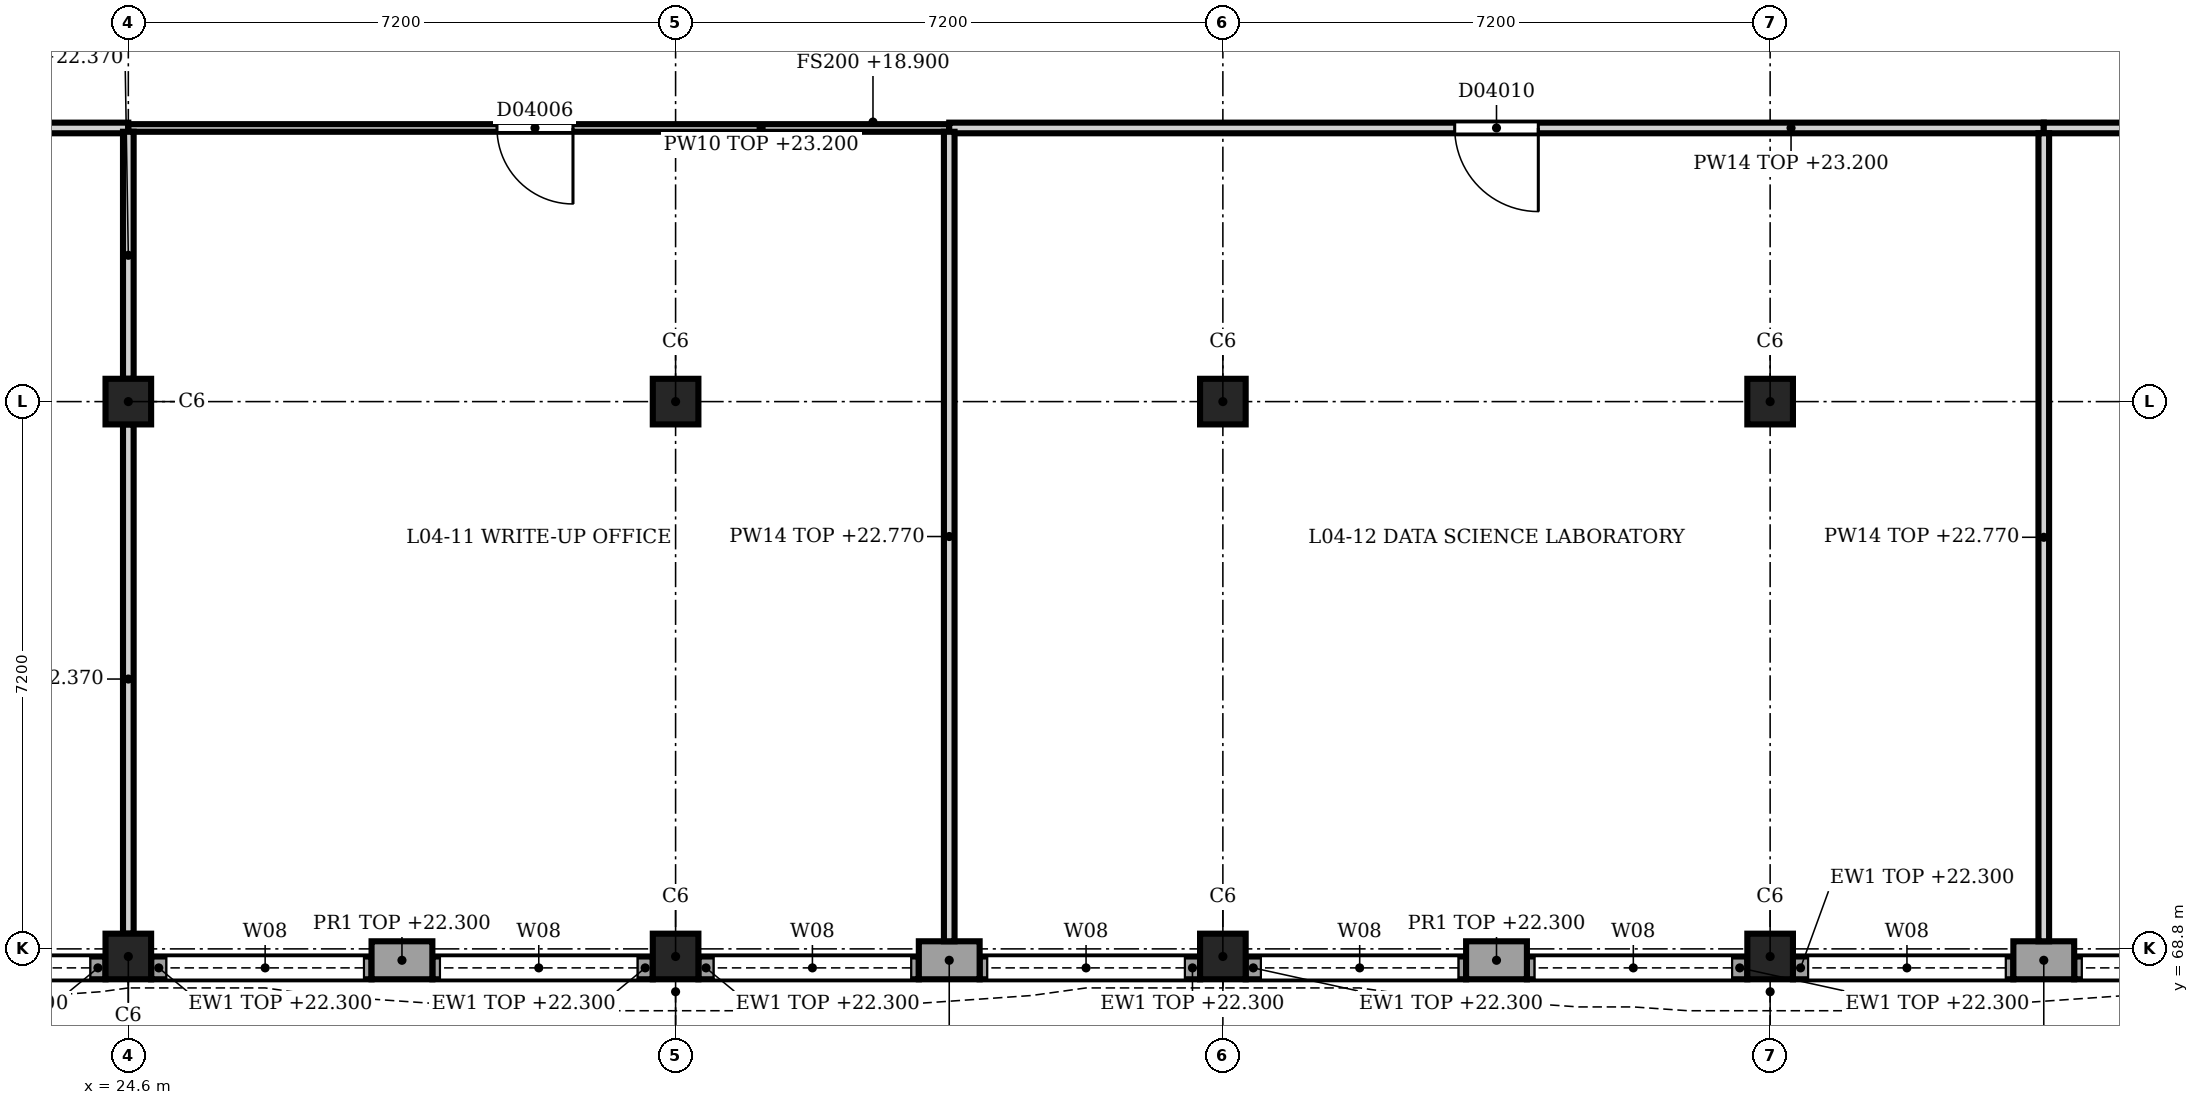
"""IFC4 building model, lengths in metres.
Left out: names, types, materials, properties, quantities, classifications, styles, units other than length and angle.
Written with IfcOpenShell. Run it as: python <this file> out.ifc"""

import sys

from ifc_helpers import new_model, si_unit, direction, frame, frame_2d, origin, origin_2d, place, context, subcontext, project, spatial, rectangle, extrude, element, fill, save


model = new_model("IFC4")
c1 = context("Model", 3, precision=1e-05, world=origin(), true_north=direction((0.0, 1.0)))
c2 = subcontext(c1, "Body", "Model", "MODEL_VIEW")
j1 = project(units=[si_unit("LENGTHUNIT", "METRE"), si_unit("PLANEANGLEUNIT", "RADIAN")], contexts=[c1])
p1 = place(None, origin())
s1 = spatial("IfcSite", under=j1, at=p1, CompositionType="ELEMENT")
p2 = place(p1, origin())
s2 = spatial("IfcBuilding", under=s1, at=p2, CompositionType="ELEMENT")
p3 = place(p2, frame((0.0, 0.0, 18.9)))
s3 = spatial("IfcBuildingStorey", under=s2, at=p3, CompositionType="ELEMENT", Elevation=18.9)
for number, where, z_axis, x_axis in (
    (1, (24.6, 68.7, 0.0), (0.0, 0.0, 1.0), (1.0, 0.0, 0.0)),
    (2, (24.6, 76.0, 0.0), (0.0, 0.0, 1.0), (1.0, 0.0, 0.0)),
    (3, (31.8, 68.7, 0.0), (0.0, 0.0, 1.0), (1.0, 0.0, 0.0)),
    (4, (31.8, 76.0, 0.0), (0.0, 0.0, 1.0), (1.0, 0.0, 0.0)),
    (5, (39.0, 68.7, 0.0), (0.0, 0.0, 1.0), (1.0, 0.0, 0.0)),
    (6, (39.0, 76.0, 0.0), (0.0, 0.0, 1.0), (1.0, 0.0, 0.0)),
    (7, (46.2, 68.7, 0.0), (0.0, 0.0, 1.0), (1.0, 0.0, 0.0)),
    (8, (46.2, 76.0, 0.0), (0.0, 0.0, 1.0), (1.0, 0.0, 0.0)),
):
    element("IfcColumn", number, at=place(p3, frame(where, z_axis=z_axis, x_axis=x_axis)), inside=s3, PredefinedType="COLUMN", context=c2, shape_type="SweptSolid", body=[
        extrude(rectangle(XDim=0.6, YDim=0.6, at=origin_2d()), origin(), (0.0, 0.0, 1.0), 4.5),
    ])
for number, where, z_axis, x_axis in (
    (9, (50.2, 68.65, 0.0), (0.0, 0.0, 1.0), (-1.0, 0.0, 0.0)),
    (10, (43.0, 68.65, 0.0), (0.0, 0.0, 1.0), (-1.0, 0.0, 0.0)),
    (11, (35.8, 68.65, 0.0), (0.0, 0.0, 1.0), (-1.0, 0.0, 0.0)),
    (12, (28.6, 68.65, 0.0), (0.0, 0.0, 1.0), (-1.0, 0.0, 0.0)),
):
    element("IfcWall", number, at=place(p3, frame(where, z_axis=z_axis, x_axis=x_axis)), inside=s3, PredefinedType="SOLIDWALL", context=c2, shape_type="SweptSolid", body=[
        extrude(rectangle(XDim=0.8, YDim=0.5, at=frame_2d((0.4, 0.0))), origin(), (0.0, 0.0, 1.0), 3.4),
    ])
p4 = place(p3, frame((53.1, 68.55, 0.0), z_axis=(0.0, 0.0, 1.0), x_axis=(-1.0, 0.0, 0.0)))
e13 = element("IfcWall", 13, at=p4, inside=s3, PredefinedType="SOLIDWALL", context=c2, shape_type="SweptSolid", body=[
    extrude(rectangle(XDim=2.9, YDim=0.3, at=frame_2d((1.45, 0.0))), origin(), (0.0, 0.0, 1.0), 3.4),
])
p5 = place(p4, frame((0.2, 0.0, 1.2)))
e14 = element("IfcOpeningElement", 14, at=p5, cuts=e13, PredefinedType="OPENING", context=c2, shape_type="SweptSolid", body=[
    extrude(rectangle(XDim=2.6, YDim=2.1, at=frame_2d((1.3, 1.05))), frame((0.0, 0.16, 0.0), z_axis=(0.0, -1.0, 0.0), x_axis=(1.0, 0.0, 0.0)), (0.0, 0.0, 1.0), 0.32),
])
p6 = place(p3, frame((49.4, 68.55, 0.0), z_axis=(0.0, 0.0, 1.0), x_axis=(-1.0, 0.0, 0.0)))
e15 = element("IfcWall", 15, at=p6, inside=s3, PredefinedType="SOLIDWALL", context=c2, shape_type="SweptSolid", body=[
    extrude(rectangle(XDim=2.9, YDim=0.3, at=frame_2d((1.45, 0.0))), origin(), (0.0, 0.0, 1.0), 3.4),
])
p7 = place(p6, frame((0.1, 0.0, 1.2)))
e16 = element("IfcOpeningElement", 16, at=p7, cuts=e15, PredefinedType="OPENING", context=c2, shape_type="SweptSolid", body=[
    extrude(rectangle(XDim=2.6, YDim=2.1, at=frame_2d((1.3, 1.05))), frame((0.0, 0.16, 0.0), z_axis=(0.0, -1.0, 0.0), x_axis=(1.0, 0.0, 0.0)), (0.0, 0.0, 1.0), 0.32),
])
p8 = place(p3, frame((45.9, 68.55, 0.0), z_axis=(0.0, 0.0, 1.0), x_axis=(-1.0, 0.0, 0.0)))
e17 = element("IfcWall", 17, at=p8, inside=s3, PredefinedType="SOLIDWALL", context=c2, shape_type="SweptSolid", body=[
    extrude(rectangle(XDim=2.9, YDim=0.3, at=frame_2d((1.45, 0.0))), origin(), (0.0, 0.0, 1.0), 3.4),
])
p9 = place(p8, frame((0.2, 0.0, 1.2)))
e18 = element("IfcOpeningElement", 18, at=p9, cuts=e17, PredefinedType="OPENING", context=c2, shape_type="SweptSolid", body=[
    extrude(rectangle(XDim=2.6, YDim=2.1, at=frame_2d((1.3, 1.05))), frame((0.0, 0.16, 0.0), z_axis=(0.0, -1.0, 0.0), x_axis=(1.0, 0.0, 0.0)), (0.0, 0.0, 1.0), 0.32),
])
p10 = place(p3, frame((42.2, 68.55, 0.0), z_axis=(0.0, 0.0, 1.0), x_axis=(-1.0, 0.0, 0.0)))
e19 = element("IfcWall", 19, at=p10, inside=s3, PredefinedType="SOLIDWALL", context=c2, shape_type="SweptSolid", body=[
    extrude(rectangle(XDim=2.9, YDim=0.3, at=frame_2d((1.45, 0.0))), origin(), (0.0, 0.0, 1.0), 3.4),
])
p11 = place(p10, frame((0.1, 0.0, 1.2)))
e20 = element("IfcOpeningElement", 20, at=p11, cuts=e19, PredefinedType="OPENING", context=c2, shape_type="SweptSolid", body=[
    extrude(rectangle(XDim=2.6, YDim=2.1, at=frame_2d((1.3, 1.05))), frame((0.0, 0.16, 0.0), z_axis=(0.0, -1.0, 0.0), x_axis=(1.0, 0.0, 0.0)), (0.0, 0.0, 1.0), 0.32),
])
p12 = place(p3, frame((38.7, 68.55, 0.0), z_axis=(0.0, 0.0, 1.0), x_axis=(-1.0, 0.0, 0.0)))
e21 = element("IfcWall", 21, at=p12, inside=s3, PredefinedType="SOLIDWALL", context=c2, shape_type="SweptSolid", body=[
    extrude(rectangle(XDim=2.9, YDim=0.3, at=frame_2d((1.45, 0.0))), origin(), (0.0, 0.0, 1.0), 3.4),
])
p13 = place(p12, frame((0.2, 0.0, 1.2)))
e22 = element("IfcOpeningElement", 22, at=p13, cuts=e21, PredefinedType="OPENING", context=c2, shape_type="SweptSolid", body=[
    extrude(rectangle(XDim=2.6, YDim=2.1, at=frame_2d((1.3, 1.05))), frame((0.0, 0.16, 0.0), z_axis=(0.0, -1.0, 0.0), x_axis=(1.0, 0.0, 0.0)), (0.0, 0.0, 1.0), 0.32),
])
p14 = place(p3, frame((35.0, 68.55, 0.0), z_axis=(0.0, 0.0, 1.0), x_axis=(-1.0, 0.0, 0.0)))
e23 = element("IfcWall", 23, at=p14, inside=s3, PredefinedType="SOLIDWALL", context=c2, shape_type="SweptSolid", body=[
    extrude(rectangle(XDim=2.9, YDim=0.3, at=frame_2d((1.45, 0.0))), origin(), (0.0, 0.0, 1.0), 3.4),
])
p15 = place(p14, frame((0.1, 0.0, 1.2)))
e24 = element("IfcOpeningElement", 24, at=p15, cuts=e23, PredefinedType="OPENING", context=c2, shape_type="SweptSolid", body=[
    extrude(rectangle(XDim=2.6, YDim=2.1, at=frame_2d((1.3, 1.05))), frame((0.0, 0.16, 0.0), z_axis=(0.0, -1.0, 0.0), x_axis=(1.0, 0.0, 0.0)), (0.0, 0.0, 1.0), 0.32),
])
p16 = place(p3, frame((31.5, 68.55, 0.0), z_axis=(0.0, 0.0, 1.0), x_axis=(-1.0, 0.0, 0.0)))
e25 = element("IfcWall", 25, at=p16, inside=s3, PredefinedType="SOLIDWALL", context=c2, shape_type="SweptSolid", body=[
    extrude(rectangle(XDim=2.9, YDim=0.3, at=frame_2d((1.45, 0.0))), origin(), (0.0, 0.0, 1.0), 3.4),
])
p17 = place(p16, frame((0.2, 0.0, 1.2)))
e26 = element("IfcOpeningElement", 26, at=p17, cuts=e25, PredefinedType="OPENING", context=c2, shape_type="SweptSolid", body=[
    extrude(rectangle(XDim=2.6, YDim=2.1, at=frame_2d((1.3, 1.05))), frame((0.0, 0.16, 0.0), z_axis=(0.0, -1.0, 0.0), x_axis=(1.0, 0.0, 0.0)), (0.0, 0.0, 1.0), 0.32),
])
p18 = place(p3, frame((27.8, 68.55, 0.0), z_axis=(0.0, 0.0, 1.0), x_axis=(-1.0, 0.0, 0.0)))
e27 = element("IfcWall", 27, at=p18, inside=s3, PredefinedType="SOLIDWALL", context=c2, shape_type="SweptSolid", body=[
    extrude(rectangle(XDim=2.9, YDim=0.3, at=frame_2d((1.45, 0.0))), origin(), (0.0, 0.0, 1.0), 3.4),
])
p19 = place(p18, frame((0.1, 0.0, 1.2)))
e28 = element("IfcOpeningElement", 28, at=p19, cuts=e27, PredefinedType="OPENING", context=c2, shape_type="SweptSolid", body=[
    extrude(rectangle(XDim=2.6, YDim=2.1, at=frame_2d((1.3, 1.05))), frame((0.0, 0.16, 0.0), z_axis=(0.0, -1.0, 0.0), x_axis=(1.0, 0.0, 0.0)), (0.0, 0.0, 1.0), 0.32),
])
p20 = place(p3, frame((24.3, 68.55, 0.0), z_axis=(0.0, 0.0, 1.0), x_axis=(-1.0, 0.0, 0.0)))
e29 = element("IfcWall", 29, at=p20, inside=s3, PredefinedType="SOLIDWALL", context=c2, shape_type="SweptSolid", body=[
    extrude(rectangle(XDim=2.9, YDim=0.3, at=frame_2d((1.45, 0.0))), origin(), (0.0, 0.0, 1.0), 3.4),
])
p21 = place(p20, frame((0.2, 0.0, 1.2)))
e30 = element("IfcOpeningElement", 30, at=p21, cuts=e29, PredefinedType="OPENING", context=c2, shape_type="SweptSolid", body=[
    extrude(rectangle(XDim=2.6, YDim=2.1, at=frame_2d((1.3, 1.05))), frame((0.0, 0.16, 0.0), z_axis=(0.0, -1.0, 0.0), x_axis=(1.0, 0.0, 0.0)), (0.0, 0.0, 1.0), 0.32),
])
p22 = place(p3, frame((24.6, 79.6, 0.0), z_axis=(0.0, 0.0, 1.0), x_axis=(-1.0, 0.0, 0.0)))
e31 = element("IfcWall", 31, at=p22, inside=s3, PredefinedType="PARTITIONING", context=c2, shape_type="SweptSolid", body=[
    extrude(rectangle(XDim=21.5, YDim=0.14, at=frame_2d((10.75, 0.0))), origin(), (0.0, 0.0, 1.0), 4.3),
])
p23 = place(p22, frame((10.25, 0.0, 0.0)))
e32 = element("IfcOpeningElement", 32, at=p23, cuts=e31, PredefinedType="OPENING", context=c2, shape_type="SweptSolid", body=[
    extrude(rectangle(XDim=1.1, YDim=2.2, at=frame_2d((0.55, 1.1))), frame((0.0, 0.08, 0.0), z_axis=(0.0, -1.0, 0.0), x_axis=(1.0, 0.0, 0.0)), (0.0, 0.0, 1.0), 0.16),
])
p24 = place(p3, frame((35.4, 79.6, 0.0), z_axis=(0.0, 0.0, 1.0), x_axis=(-1.0, 0.0, 0.0)))
e33 = element("IfcWall", 33, at=p24, inside=s3, PredefinedType="PARTITIONING", context=c2, shape_type="SweptSolid", body=[
    extrude(rectangle(XDim=10.8, YDim=0.1, at=frame_2d((5.4, 0.0))), origin(), (0.0, 0.0, 1.0), 4.3),
])
p25 = place(p24, frame((4.95, 0.0, 0.0)))
e34 = element("IfcOpeningElement", 34, at=p25, cuts=e33, PredefinedType="OPENING", context=c2, shape_type="SweptSolid", body=[
    extrude(rectangle(XDim=1.0, YDim=2.1, at=frame_2d((0.5, 1.05))), frame((0.0, 0.06, 0.0), z_axis=(0.0, -1.0, 0.0), x_axis=(1.0, 0.0, 0.0)), (0.0, 0.0, 1.0), 0.12),
])
p26 = place(p3, frame((49.8, 79.6, 0.0), z_axis=(0.0, 0.0, 1.0), x_axis=(-1.0, 0.0, 0.0)))
e35 = element("IfcWall", 35, at=p26, inside=s3, PredefinedType="PARTITIONING", context=c2, shape_type="SweptSolid", body=[
    extrude(rectangle(XDim=14.4, YDim=0.14, at=frame_2d((7.2, 0.0))), origin(), (0.0, 0.0, 1.0), 4.3),
])
p27 = place(p26, frame((6.65, 0.0, 0.0)))
e36 = element("IfcOpeningElement", 36, at=p27, cuts=e35, PredefinedType="OPENING", context=c2, shape_type="SweptSolid", body=[
    extrude(rectangle(XDim=1.1, YDim=2.2, at=frame_2d((0.55, 1.1))), frame((0.0, 0.08, 0.0), z_axis=(0.0, -1.0, 0.0), x_axis=(1.0, 0.0, 0.0)), (0.0, 0.0, 1.0), 0.16),
])
p28 = place(p3, frame((64.2, 79.6, 0.0), z_axis=(0.0, 0.0, 1.0), x_axis=(-1.0, 0.0, 0.0)))
e37 = element("IfcWall", 37, at=p28, inside=s3, PredefinedType="PARTITIONING", context=c2, shape_type="SweptSolid", body=[
    extrude(rectangle(XDim=14.4, YDim=0.14, at=frame_2d((7.2, 0.0))), origin(), (0.0, 0.0, 1.0), 4.3),
])
p29 = place(p28, frame((6.65, 0.0, 0.0)))
e38 = element("IfcOpeningElement", 38, at=p29, cuts=e37, PredefinedType="OPENING", context=c2, shape_type="SweptSolid", body=[
    extrude(rectangle(XDim=1.2, YDim=2.1, at=frame_2d((0.6, 1.05))), frame((0.0, 0.08, 0.0), z_axis=(0.0, -1.0, 0.0), x_axis=(1.0, 0.0, 0.0)), (0.0, 0.0, 1.0), 0.16),
])
p30 = place(p3, frame((24.6, 69.0, 0.0), z_axis=(0.0, 0.0, 1.0), x_axis=(0.0, 1.0, 0.0)))
e39 = element("IfcWall", 39, at=p30, inside=s3, PredefinedType="PARTITIONING", context=c2, shape_type="SweptSolid", body=[
    extrude(rectangle(XDim=6.7, YDim=0.14, at=frame_2d((3.35, 0.0))), origin(), (0.0, 0.0, 1.0), 3.47),
])
p31 = place(p3, frame((24.6, 76.3, 0.0), z_axis=(0.0, 0.0, 1.0), x_axis=(0.0, 1.0, 0.0)))
e40 = element("IfcWall", 40, at=p31, inside=s3, PredefinedType="PARTITIONING", context=c2, shape_type="SweptSolid", body=[
    extrude(rectangle(XDim=3.25, YDim=0.14, at=frame_2d((1.625, 0.0))), origin(), (0.0, 0.0, 1.0), 3.47),
])
p32 = place(p3, frame((35.4, 68.9, 0.0), z_axis=(0.0, 0.0, 1.0), x_axis=(0.0, 1.0, 0.0)))
e41 = element("IfcWall", 41, at=p32, inside=s3, PredefinedType="PARTITIONING", context=c2, shape_type="SweptSolid", body=[
    extrude(rectangle(XDim=10.65, YDim=0.14, at=frame_2d((5.325, 0.0))), origin(), (0.0, 0.0, 1.0), 3.87),
])
p33 = place(p3, frame((49.8, 68.9, 0.0), z_axis=(0.0, 0.0, 1.0), x_axis=(0.0, 1.0, 0.0)))
e42 = element("IfcWall", 42, at=p33, inside=s3, PredefinedType="PARTITIONING", context=c2, shape_type="SweptSolid", body=[
    extrude(rectangle(XDim=10.63, YDim=0.14, at=frame_2d((5.315, 0.0))), origin(), (0.0, 0.0, 1.0), 3.87),
])
p34 = place(p5, origin())
e43 = element("IfcWindow", 43, at=p34, inside=s3, PartitioningType="SINGLE_PANEL", PredefinedType="WINDOW", context=c2, shape_type="SweptSolid", body=[
    extrude(rectangle(XDim=2.6, YDim=2.1, at=frame_2d((1.3, 1.05))), frame((0.0, 0.03, 0.0), z_axis=(0.0, -1.0, 0.0), x_axis=(1.0, 0.0, 0.0)), (0.0, 0.0, 1.0), 0.06),
])
fill(e14, e43)
p35 = place(p7, origin())
e44 = element("IfcWindow", 44, at=p35, inside=s3, PartitioningType="SINGLE_PANEL", PredefinedType="WINDOW", context=c2, shape_type="SweptSolid", body=[
    extrude(rectangle(XDim=2.6, YDim=2.1, at=frame_2d((1.3, 1.05))), frame((0.0, 0.03, 0.0), z_axis=(0.0, -1.0, 0.0), x_axis=(1.0, 0.0, 0.0)), (0.0, 0.0, 1.0), 0.06),
])
fill(e16, e44)
p36 = place(p9, origin())
e45 = element("IfcWindow", 45, at=p36, inside=s3, PartitioningType="SINGLE_PANEL", PredefinedType="WINDOW", context=c2, shape_type="SweptSolid", body=[
    extrude(rectangle(XDim=2.6, YDim=2.1, at=frame_2d((1.3, 1.05))), frame((0.0, 0.03, 0.0), z_axis=(0.0, -1.0, 0.0), x_axis=(1.0, 0.0, 0.0)), (0.0, 0.0, 1.0), 0.06),
])
fill(e18, e45)
p37 = place(p11, origin())
e46 = element("IfcWindow", 46, at=p37, inside=s3, PartitioningType="SINGLE_PANEL", PredefinedType="WINDOW", context=c2, shape_type="SweptSolid", body=[
    extrude(rectangle(XDim=2.6, YDim=2.1, at=frame_2d((1.3, 1.05))), frame((0.0, 0.03, 0.0), z_axis=(0.0, -1.0, 0.0), x_axis=(1.0, 0.0, 0.0)), (0.0, 0.0, 1.0), 0.06),
])
fill(e20, e46)
p38 = place(p13, origin())
e47 = element("IfcWindow", 47, at=p38, inside=s3, PartitioningType="SINGLE_PANEL", PredefinedType="WINDOW", context=c2, shape_type="SweptSolid", body=[
    extrude(rectangle(XDim=2.6, YDim=2.1, at=frame_2d((1.3, 1.05))), frame((0.0, 0.03, 0.0), z_axis=(0.0, -1.0, 0.0), x_axis=(1.0, 0.0, 0.0)), (0.0, 0.0, 1.0), 0.06),
])
fill(e22, e47)
p39 = place(p15, origin())
e48 = element("IfcWindow", 48, at=p39, inside=s3, PartitioningType="SINGLE_PANEL", PredefinedType="WINDOW", context=c2, shape_type="SweptSolid", body=[
    extrude(rectangle(XDim=2.6, YDim=2.1, at=frame_2d((1.3, 1.05))), frame((0.0, 0.03, 0.0), z_axis=(0.0, -1.0, 0.0), x_axis=(1.0, 0.0, 0.0)), (0.0, 0.0, 1.0), 0.06),
])
fill(e24, e48)
p40 = place(p17, origin())
e49 = element("IfcWindow", 49, at=p40, inside=s3, PartitioningType="SINGLE_PANEL", PredefinedType="WINDOW", context=c2, shape_type="SweptSolid", body=[
    extrude(rectangle(XDim=2.6, YDim=2.1, at=frame_2d((1.3, 1.05))), frame((0.0, 0.03, 0.0), z_axis=(0.0, -1.0, 0.0), x_axis=(1.0, 0.0, 0.0)), (0.0, 0.0, 1.0), 0.06),
])
fill(e26, e49)
p41 = place(p19, origin())
e50 = element("IfcWindow", 50, at=p41, inside=s3, PartitioningType="SINGLE_PANEL", PredefinedType="WINDOW", context=c2, shape_type="SweptSolid", body=[
    extrude(rectangle(XDim=2.6, YDim=2.1, at=frame_2d((1.3, 1.05))), frame((0.0, 0.03, 0.0), z_axis=(0.0, -1.0, 0.0), x_axis=(1.0, 0.0, 0.0)), (0.0, 0.0, 1.0), 0.06),
])
fill(e28, e50)
p42 = place(p21, origin())
e51 = element("IfcWindow", 51, at=p42, inside=s3, PartitioningType="SINGLE_PANEL", PredefinedType="WINDOW", context=c2, shape_type="SweptSolid", body=[
    extrude(rectangle(XDim=2.6, YDim=2.1, at=frame_2d((1.3, 1.05))), frame((0.0, 0.03, 0.0), z_axis=(0.0, -1.0, 0.0), x_axis=(1.0, 0.0, 0.0)), (0.0, 0.0, 1.0), 0.06),
])
fill(e30, e51)
p43 = place(p25, origin())
e52 = element("IfcDoor", 52, at=p43, inside=s3, OperationType="SINGLE_SWING_RIGHT", PredefinedType="DOOR", context=c2, shape_type="SweptSolid", body=[
    extrude(rectangle(XDim=1.0, YDim=2.1, at=frame_2d((0.5, 1.05))), frame((0.0, 0.025, 0.0), z_axis=(0.0, -1.0, 0.0), x_axis=(1.0, 0.0, 0.0)), (0.0, 0.0, 1.0), 0.05),
])
fill(e34, e52)
p44 = place(p27, origin())
e53 = element("IfcDoor", 53, at=p44, inside=s3, OperationType="SINGLE_SWING_LEFT", PredefinedType="DOOR", context=c2, shape_type="SweptSolid", body=[
    extrude(rectangle(XDim=1.1, YDim=2.2, at=frame_2d((0.55, 1.1))), frame((0.0, 0.025, 0.0), z_axis=(0.0, -1.0, 0.0), x_axis=(1.0, 0.0, 0.0)), (0.0, 0.0, 1.0), 0.05),
])
fill(e36, e53)
save(model, sys.argv[1])
